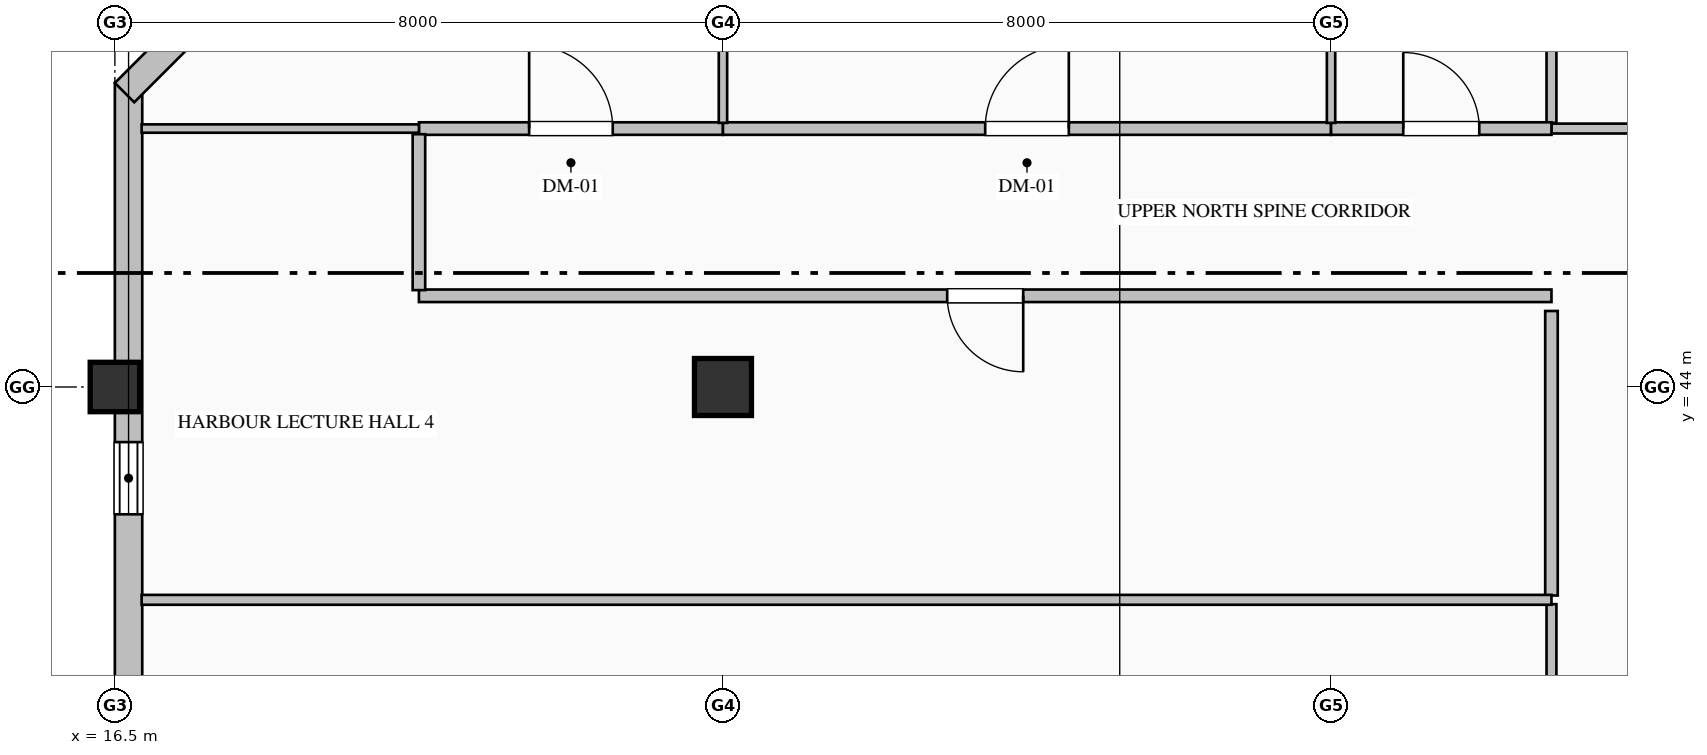
"""IFC4 building model, lengths in metres.
Left out: names, types, materials, properties, quantities, classifications, styles, units other than length and angle.
Written with IfcOpenShell. Run it as: python <this file> out.ifc"""

import sys

from ifc_helpers import new_model, si_unit, direction, frame, frame_2d, origin, origin_2d, place, context, subcontext, project, spatial, rectangle, hollow_rectangle, extrude, element, fill, save


model = new_model("IFC4")
c1 = context("Model", 3, precision=1e-05, world=origin(), true_north=direction((0.0, 1.0)))
c2 = subcontext(c1, "Body", "Model", "MODEL_VIEW")
j1 = project(units=[si_unit("LENGTHUNIT", "METRE"), si_unit("PLANEANGLEUNIT", "RADIAN")], contexts=[c1])
p1 = place(None, origin())
s1 = spatial("IfcSite", under=j1, at=p1, CompositionType="ELEMENT")
p2 = place(p1, origin())
s2 = spatial("IfcBuilding", under=s1, at=p2, CompositionType="ELEMENT")
p3 = place(p2, frame((0.0, 0.0, 303.2)))
s3 = spatial("IfcBuildingStorey", under=s2, at=p3, CompositionType="ELEMENT", Elevation=303.2)
p4 = place(p3, frame((16.5, 44.0, 0.0), z_axis=(0.0, 0.0, 1.0), x_axis=(1.0, 0.0, 0.0)))
e1 = element("IfcColumn", 1, at=p4, inside=s3, PredefinedType="COLUMN", context=c2, shape_type="SweptSolid", body=[
    extrude(hollow_rectangle(XDim=0.65, YDim=0.65, WallThickness=0.028, at=origin_2d()), origin(), (0.0, 0.0, 1.0), 4.0),
])
p5 = place(p3, frame((24.5, 44.0, 0.0), z_axis=(0.0, 0.0, 1.0), x_axis=(1.0, 0.0, 0.0)))
e2 = element("IfcColumn", 2, at=p5, inside=s3, PredefinedType="COLUMN", context=c2, shape_type="SweptSolid", body=[
    extrude(rectangle(XDim=0.75, YDim=0.75, at=origin_2d()), origin(), (0.0, 0.0, 1.0), 4.0),
])
p6 = place(p3, frame((16.68, 32.0, 0.0), z_axis=(0.0, 0.0, 1.0), x_axis=(0.0, 1.0, 0.0)))
e3 = element("IfcWall", 3, at=p6, inside=s3, PredefinedType="SOLIDWALL", context=c2, shape_type="SweptSolid", body=[
    extrude(rectangle(XDim=16.0, YDim=0.36, at=frame_2d((8.0, 0.0))), origin(), (0.0, 0.0, 1.0), 3.335),
])
p7 = place(p6, frame((6.525, 0.0, 0.9)))
e4 = element("IfcOpeningElement", 4, at=p7, cuts=e3, PredefinedType="OPENING", context=c2, shape_type="SweptSolid", body=[
    extrude(rectangle(XDim=1.35, YDim=1.85, at=frame_2d((0.675, 0.925))), frame((0.0, 0.19, 0.0), z_axis=(0.0, -1.0, 0.0), x_axis=(1.0, 0.0, 0.0)), (0.0, 0.0, 1.0), 0.38),
])
p8 = place(p6, frame((10.325, 0.0, 0.9)))
e5 = element("IfcOpeningElement", 5, at=p8, cuts=e3, PredefinedType="OPENING", context=c2, shape_type="SweptSolid", body=[
    extrude(rectangle(XDim=0.95, YDim=1.85, at=frame_2d((0.475, 0.925))), frame((0.0, 0.19, 0.0), z_axis=(0.0, -1.0, 0.0), x_axis=(1.0, 0.0, 0.0)), (0.0, 0.0, 1.0), 0.38),
])
p9 = place(p3, frame((16.627, 47.873, 0.0), z_axis=(0.0, 0.0, 1.0), x_axis=(0.707106781187, 0.707106781187, 0.0)))
e6 = element("IfcWall", 6, at=p9, inside=s3, PredefinedType="SOLIDWALL", context=c2, shape_type="SweptSolid", body=[
    extrude(rectangle(XDim=5.657, YDim=0.36, at=frame_2d((2.828, 0.0))), origin(), (0.0, 0.0, 1.0), 3.785),
])
p10 = place(p3, frame((37.8, 47.4, 0.0), z_axis=(0.0, 0.0, 1.0), x_axis=(-1.0, 0.0, 0.0)))
e7 = element("IfcWall", 7, at=p10, inside=s3, PredefinedType="PARTITIONING", context=c2, shape_type="SweptSolid", body=[
    extrude(rectangle(XDim=2.4, YDim=0.13, at=frame_2d((1.2, 0.0))), origin(), (0.0, 0.0, 1.0), 3.785),
])
p11 = place(p3, frame((35.4, 47.475, 0.0), z_axis=(0.0, 0.0, 1.0), x_axis=(0.0, 1.0, 0.0)))
e8 = element("IfcWall", 8, at=p11, inside=s3, PredefinedType="PARTITIONING", context=c2, shape_type="SweptSolid", body=[
    extrude(rectangle(XDim=4.173, YDim=0.13, at=frame_2d((2.087, 0.0))), origin(), (0.0, 0.0, 1.0), 3.785),
])
p12 = place(p3, frame((20.5, 47.4, 0.0), z_axis=(0.0, 0.0, 1.0), x_axis=(1.0, 0.0, 0.0)))
e9 = element("IfcWall", 9, at=p12, inside=s3, PredefinedType="PARTITIONING", context=c2, shape_type="SweptSolid", body=[
    extrude(rectangle(XDim=4.0, YDim=0.165, at=frame_2d((2.0, 0.0))), origin(), (0.0, 0.0, 1.0), 3.785),
])
p13 = place(p12, frame((1.45, 0.0, 0.0)))
e10 = element("IfcOpeningElement", 10, at=p13, cuts=e9, PredefinedType="OPENING", context=c2, shape_type="SweptSolid", body=[
    extrude(rectangle(XDim=1.1, YDim=2.2, at=frame_2d((0.55, 1.1))), frame((0.0, 0.093, 0.0), z_axis=(0.0, -1.0, 0.0), x_axis=(1.0, 0.0, 0.0)), (0.0, 0.0, 1.0), 0.185),
])
p14 = place(p3, frame((24.5, 47.4, 0.0), z_axis=(0.0, 0.0, 1.0), x_axis=(1.0, 0.0, 0.0)))
e11 = element("IfcWall", 11, at=p14, inside=s3, PredefinedType="PARTITIONING", context=c2, shape_type="SweptSolid", body=[
    extrude(rectangle(XDim=8.0, YDim=0.165, at=frame_2d((4.0, 0.0))), origin(), (0.0, 0.0, 1.0), 3.785),
])
p15 = place(p14, frame((3.45, 0.0, 0.0)))
e12 = element("IfcOpeningElement", 12, at=p15, cuts=e11, PredefinedType="OPENING", context=c2, shape_type="SweptSolid", body=[
    extrude(rectangle(XDim=1.1, YDim=2.2, at=frame_2d((0.55, 1.1))), frame((0.0, 0.093, 0.0), z_axis=(0.0, -1.0, 0.0), x_axis=(1.0, 0.0, 0.0)), (0.0, 0.0, 1.0), 0.185),
])
p16 = place(p3, frame((32.5, 47.4, 0.0), z_axis=(0.0, 0.0, 1.0), x_axis=(1.0, 0.0, 0.0)))
e13 = element("IfcWall", 13, at=p16, inside=s3, PredefinedType="PARTITIONING", context=c2, shape_type="SweptSolid", body=[
    extrude(rectangle(XDim=2.9, YDim=0.165, at=frame_2d((1.45, 0.0))), origin(), (0.0, 0.0, 1.0), 3.785),
])
p17 = place(p16, frame((0.95, 0.0, 0.0)))
e14 = element("IfcOpeningElement", 14, at=p17, cuts=e13, PredefinedType="OPENING", context=c2, shape_type="SweptSolid", body=[
    extrude(rectangle(XDim=1.0, YDim=2.15, at=frame_2d((0.5, 1.075))), frame((0.0, 0.093, 0.0), z_axis=(0.0, -1.0, 0.0), x_axis=(1.0, 0.0, 0.0)), (0.0, 0.0, 1.0), 0.185),
])
p18 = place(p3, frame((35.4, 45.2, 0.0), z_axis=(0.0, 0.0, 1.0), x_axis=(-1.0, 0.0, 0.0)))
e15 = element("IfcWall", 15, at=p18, inside=s3, PredefinedType="PARTITIONING", context=c2, shape_type="SweptSolid", body=[
    extrude(rectangle(XDim=14.9, YDim=0.165, at=frame_2d((7.45, 0.0))), origin(), (0.0, 0.0, 1.0), 3.785),
])
p19 = place(p18, frame((6.95, 0.0, 0.0)))
e16 = element("IfcOpeningElement", 16, at=p19, cuts=e15, PredefinedType="OPENING", context=c2, shape_type="SweptSolid", body=[
    extrude(rectangle(XDim=1.0, YDim=2.15, at=frame_2d((0.5, 1.075))), frame((0.0, 0.093, 0.0), z_axis=(0.0, -1.0, 0.0), x_axis=(1.0, 0.0, 0.0)), (0.0, 0.0, 1.0), 0.185),
])
p20 = place(p3, frame((20.5, 45.274, 0.0), z_axis=(0.0, 0.0, 1.0), x_axis=(0.0, 1.0, 0.0)))
e17 = element("IfcWall", 17, at=p20, inside=s3, PredefinedType="PARTITIONING", context=c2, shape_type="SweptSolid", body=[
    extrude(rectangle(XDim=2.051, YDim=0.165, at=frame_2d((1.025, 0.0))), origin(), (0.0, 0.0, 1.0), 3.785),
])
p21 = place(p3, frame((35.4, 36.057, 0.0), z_axis=(0.0, 0.0, 1.0), x_axis=(0.0, 1.0, 0.0)))
e18 = element("IfcWall", 18, at=p21, inside=s3, PredefinedType="PARTITIONING", context=c2, shape_type="SweptSolid", body=[
    extrude(rectangle(XDim=5.086, YDim=0.13, at=frame_2d((2.543, 0.0))), origin(), (0.0, 0.0, 1.0), 3.785),
])
p22 = place(p21, frame((2.043, 0.0, 0.0)))
e19 = element("IfcOpeningElement", 19, at=p22, cuts=e18, PredefinedType="OPENING", context=c2, shape_type="SweptSolid", body=[
    extrude(rectangle(XDim=1.0, YDim=2.15, at=frame_2d((0.5, 1.075))), frame((0.0, 0.075, 0.0), z_axis=(0.0, -1.0, 0.0), x_axis=(1.0, 0.0, 0.0)), (0.0, 0.0, 1.0), 0.15),
])
p23 = place(p3, frame((35.4, 41.257, 0.0), z_axis=(0.0, 0.0, 1.0), x_axis=(0.0, 1.0, 0.0)))
e20 = element("IfcWall", 20, at=p23, inside=s3, PredefinedType="PARTITIONING", context=c2, shape_type="SweptSolid", body=[
    extrude(rectangle(XDim=3.743, YDim=0.165, at=frame_2d((1.872, 0.0))), origin(), (0.0, 0.0, 1.0), 3.785),
])
p24 = place(p3, frame((24.5, 51.648, 0.0), z_axis=(0.0, 0.0, 1.0), x_axis=(0.0, -1.0, 0.0)))
e21 = element("IfcWall", 21, at=p24, inside=s3, PredefinedType="MOVABLE", context=c2, shape_type="SweptSolid", body=[
    extrude(rectangle(XDim=4.173, YDim=0.11, at=frame_2d((2.087, 0.0))), origin(), (0.0, 0.0, 1.0), 3.177),
])
p25 = place(p3, frame((20.5, 47.4, 0.0), z_axis=(0.0, 0.0, 1.0), x_axis=(-1.0, 0.0, 0.0)))
e22 = element("IfcWall", 22, at=p25, inside=s3, PredefinedType="MOVABLE", context=c2, shape_type="SweptSolid", body=[
    extrude(rectangle(XDim=3.648, YDim=0.11, at=frame_2d((1.824, 0.0))), origin(), (0.0, 0.0, 1.0), 3.785),
])
p26 = place(p3, frame((32.5, 51.648, 0.0), z_axis=(0.0, 0.0, 1.0), x_axis=(0.0, -1.0, 0.0)))
e23 = element("IfcWall", 23, at=p26, inside=s3, PredefinedType="MOVABLE", context=c2, shape_type="SweptSolid", body=[
    extrude(rectangle(XDim=4.173, YDim=0.11, at=frame_2d((2.087, 0.0))), origin(), (0.0, 0.0, 1.0), 3.785),
])
p27 = place(p3, frame((16.852, 41.2, 0.0), z_axis=(0.0, 0.0, 1.0), x_axis=(1.0, 0.0, 0.0)))
e24 = element("IfcWall", 24, at=p27, inside=s3, PredefinedType="PARTITIONING", context=c2, shape_type="SweptSolid", body=[
    extrude(rectangle(XDim=18.548, YDim=0.13, at=frame_2d((9.274, 0.0))), origin(), (0.0, 0.0, 1.0), 3.785),
])
p28 = place(p8, origin())
e25 = element("IfcWindow", 25, at=p28, inside=s3, PartitioningType="SINGLE_PANEL", PredefinedType="WINDOW", context=c2, shape_type="SweptSolid", body=[
    extrude(rectangle(XDim=0.95, YDim=1.85, at=frame_2d((0.475, 0.925))), frame((0.0, 0.15, 0.0), z_axis=(0.0, -1.0, 0.0), x_axis=(1.0, 0.0, 0.0)), (0.0, 0.0, 1.0), 0.06),
])
fill(e5, e25)
p29 = place(p13, origin())
e26 = element("IfcDoor", 26, at=p29, inside=s3, OperationType="SINGLE_SWING_LEFT", PredefinedType="DOOR", context=c2, shape_type="SweptSolid", body=[
    extrude(rectangle(XDim=1.1, YDim=2.2, at=frame_2d((0.55, 1.1))), frame((0.0, 0.025, 0.0), z_axis=(0.0, -1.0, 0.0), x_axis=(1.0, 0.0, 0.0)), (0.0, 0.0, 1.0), 0.05),
])
fill(e10, e26)
p30 = place(p15, origin())
e27 = element("IfcDoor", 27, at=p30, inside=s3, OperationType="SINGLE_SWING_RIGHT", PredefinedType="DOOR", context=c2, shape_type="SweptSolid", body=[
    extrude(rectangle(XDim=1.1, YDim=2.2, at=frame_2d((0.55, 1.1))), frame((0.0, 0.025, 0.0), z_axis=(0.0, -1.0, 0.0), x_axis=(1.0, 0.0, 0.0)), (0.0, 0.0, 1.0), 0.05),
])
fill(e12, e27)
p31 = place(p17, origin())
e28 = element("IfcDoor", 28, at=p31, inside=s3, OperationType="SINGLE_SWING_LEFT", PredefinedType="DOOR", context=c2, shape_type="SweptSolid", body=[
    extrude(rectangle(XDim=1.0, YDim=2.15, at=frame_2d((0.5, 1.075))), frame((0.0, 0.025, 0.0), z_axis=(0.0, -1.0, 0.0), x_axis=(1.0, 0.0, 0.0)), (0.0, 0.0, 1.0), 0.05),
])
fill(e14, e28)
p32 = place(p19, origin())
e29 = element("IfcDoor", 29, at=p32, inside=s3, OperationType="SINGLE_SWING_LEFT", PredefinedType="DOOR", context=c2, shape_type="SweptSolid", body=[
    extrude(rectangle(XDim=1.0, YDim=2.15, at=frame_2d((0.5, 1.075))), frame((0.0, 0.025, 0.0), z_axis=(0.0, -1.0, 0.0), x_axis=(1.0, 0.0, 0.0)), (0.0, 0.0, 1.0), 0.05),
])
fill(e16, e29)
save(model, sys.argv[1])
